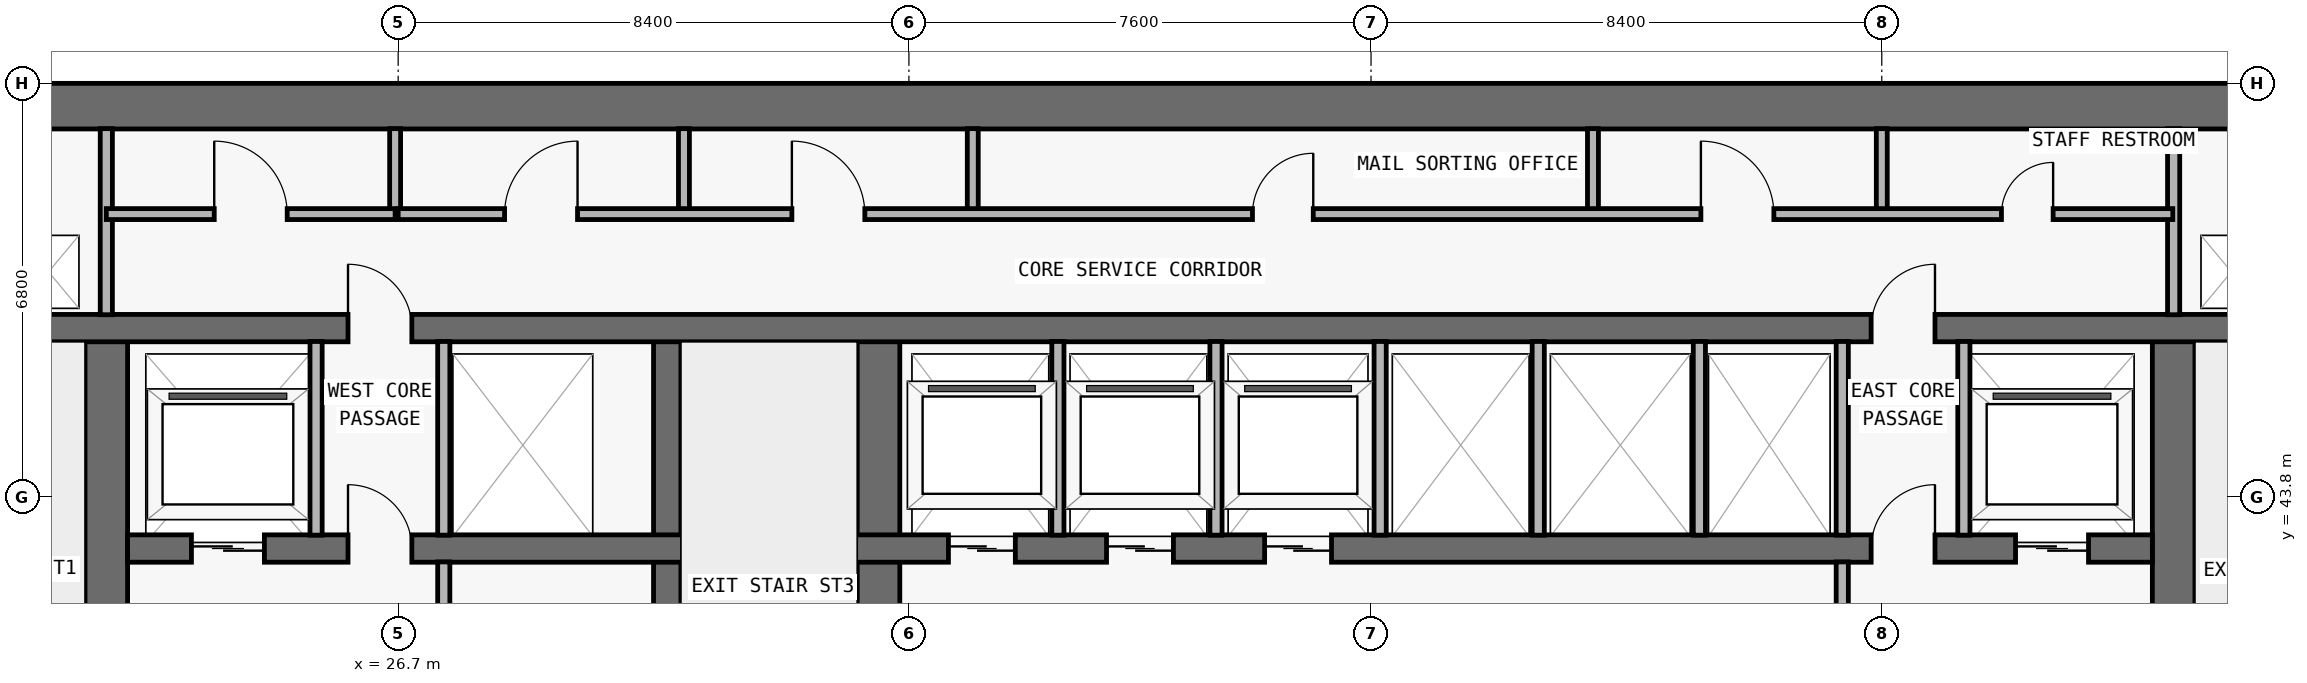
"""IFC4 building model, lengths in metres.
Left out: names, types, materials, properties, quantities, classifications, styles, units other than length and angle.
Written with IfcOpenShell. Run it as: python <this file> out.ifc"""

import sys

from ifc_helpers import new_model, si_unit, direction, frame, frame_2d, origin, place, context, subcontext, project, spatial, rectangle, extrude, element, fill, save


model = new_model("IFC4")
c1 = context("Model", 3, precision=1e-05, world=origin(), true_north=direction((0.0, 1.0)))
c2 = subcontext(c1, "Body", "Model", "MODEL_VIEW")
j1 = project(units=[si_unit("LENGTHUNIT", "METRE"), si_unit("PLANEANGLEUNIT", "RADIAN")], contexts=[c1])
p1 = place(None, origin())
s1 = spatial("IfcSite", under=j1, at=p1, CompositionType="ELEMENT")
p2 = place(p1, origin())
s2 = spatial("IfcBuilding", under=s1, at=p2, CompositionType="ELEMENT")
p3 = place(p2, frame((0.0, 0.0, 87.9)))
s3 = spatial("IfcBuildingStorey", under=s2, at=p3, CompositionType="ELEMENT", Elevation=87.9)
p4 = place(p3, frame((17.85, 50.225, 0.0), z_axis=(0.0, 0.0, 1.0), x_axis=(1.0, 0.0, 0.0)))
e1 = element("IfcWall", 1, at=p4, inside=s3, PredefinedType="SHEAR", context=c2, shape_type="SweptSolid", body=[
    extrude(rectangle(XDim=42.1, YDim=0.75, at=frame_2d((21.05, 0.0))), origin(), (0.0, 0.0, 1.0), 3.05),
])
p5 = place(p3, frame((21.9, 36.95, 0.0), z_axis=(0.0, 0.0, 1.0), x_axis=(0.0, 1.0, 0.0)))
e2 = element("IfcWall", 2, at=p5, inside=s3, PredefinedType="SHEAR", context=c2, shape_type="SweptSolid", body=[
    extrude(rectangle(XDim=9.625, YDim=0.7, at=frame_2d((4.812, 0.0))), origin(), (0.0, 0.0, 1.0), 3.05),
])
p6 = place(p5, frame((0.6, 0.0, 0.0)))
e3 = element("IfcOpeningElement", 3, at=p6, cuts=e2, PredefinedType="OPENING", context=c2, shape_type="SweptSolid", body=[
    extrude(rectangle(XDim=1.1, YDim=2.15, at=frame_2d((0.55, 1.075))), frame((0.0, 0.36, 0.0), z_axis=(0.0, -1.0, 0.0), x_axis=(1.0, 0.0, 0.0)), (0.0, 0.0, 1.0), 0.72),
])
p7 = place(p3, frame((55.9, 36.95, 0.0), z_axis=(0.0, 0.0, 1.0), x_axis=(0.0, 1.0, 0.0)))
e4 = element("IfcWall", 4, at=p7, inside=s3, PredefinedType="SHEAR", context=c2, shape_type="SweptSolid", body=[
    extrude(rectangle(XDim=9.625, YDim=0.7, at=frame_2d((4.812, 0.0))), origin(), (0.0, 0.0, 1.0), 3.05),
])
p8 = place(p7, frame((0.6, 0.0, 0.0)))
e5 = element("IfcOpeningElement", 5, at=p8, cuts=e4, PredefinedType="OPENING", context=c2, shape_type="SweptSolid", body=[
    extrude(rectangle(XDim=1.1, YDim=2.15, at=frame_2d((0.55, 1.075))), frame((0.0, 0.36, 0.0), z_axis=(0.0, -1.0, 0.0), x_axis=(1.0, 0.0, 0.0)), (0.0, 0.0, 1.0), 0.72),
])
p9 = place(p3, frame((31.125, 36.95, 0.0), z_axis=(0.0, 0.0, 1.0), x_axis=(0.0, 1.0, 0.0)))
e6 = element("IfcWall", 6, at=p9, inside=s3, PredefinedType="SHEAR", context=c2, shape_type="SweptSolid", body=[
    extrude(rectangle(XDim=9.625, YDim=0.45, at=frame_2d((4.812, 0.0))), origin(), (0.0, 0.0, 1.0), 3.05),
])
p10 = place(p3, frame((34.6, 36.95, 0.0), z_axis=(0.0, 0.0, 1.0), x_axis=(0.0, 1.0, 0.0)))
e7 = element("IfcWall", 7, at=p10, inside=s3, PredefinedType="SHEAR", context=c2, shape_type="SweptSolid", body=[
    extrude(rectangle(XDim=9.625, YDim=0.7, at=frame_2d((4.812, 0.0))), origin(), (0.0, 0.0, 1.0), 3.05),
])
p11 = place(p3, frame((22.25, 42.95, 0.0), z_axis=(0.0, 0.0, 1.0), x_axis=(1.0, 0.0, 0.0)))
e8 = element("IfcWall", 8, at=p11, inside=s3, PredefinedType="SHEAR", context=c2, shape_type="SweptSolid", body=[
    extrude(rectangle(XDim=33.3, YDim=0.45, at=frame_2d((16.65, 0.0))), origin(), (0.0, 0.0, 1.0), 3.05),
])
p12 = place(p11, frame((1.05, 0.0, 0.0)))
e9 = element("IfcOpeningElement", 9, at=p12, cuts=e8, PredefinedType="OPENING", context=c2, shape_type="SweptSolid", body=[
    extrude(rectangle(XDim=1.2, YDim=2.2, at=frame_2d((0.6, 1.1))), frame((0.0, 0.235, 0.0), z_axis=(0.0, -1.0, 0.0), x_axis=(1.0, 0.0, 0.0)), (0.0, 0.0, 1.0), 0.47),
])
p13 = place(p11, frame((31.05, 0.0, 0.0)))
e10 = element("IfcOpeningElement", 10, at=p13, cuts=e8, PredefinedType="OPENING", context=c2, shape_type="SweptSolid", body=[
    extrude(rectangle(XDim=1.2, YDim=2.2, at=frame_2d((0.6, 1.1))), frame((0.0, 0.235, 0.0), z_axis=(0.0, -1.0, 0.0), x_axis=(1.0, 0.0, 0.0)), (0.0, 0.0, 1.0), 0.47),
])
p14 = place(p11, frame((13.5, 0.0, 0.0)))
e11 = element("IfcOpeningElement", 11, at=p14, cuts=e8, PredefinedType="OPENING", context=c2, shape_type="SweptSolid", body=[
    extrude(rectangle(XDim=1.1, YDim=2.2, at=frame_2d((0.55, 1.1))), frame((0.0, 0.235, 0.0), z_axis=(0.0, -1.0, 0.0), x_axis=(1.0, 0.0, 0.0)), (0.0, 0.0, 1.0), 0.47),
])
p15 = place(p11, frame((16.1, 0.0, 0.0)))
e12 = element("IfcOpeningElement", 12, at=p15, cuts=e8, PredefinedType="OPENING", context=c2, shape_type="SweptSolid", body=[
    extrude(rectangle(XDim=1.1, YDim=2.2, at=frame_2d((0.55, 1.1))), frame((0.0, 0.235, 0.0), z_axis=(0.0, -1.0, 0.0), x_axis=(1.0, 0.0, 0.0)), (0.0, 0.0, 1.0), 0.47),
])
p16 = place(p11, frame((18.7, 0.0, 0.0)))
e13 = element("IfcOpeningElement", 13, at=p16, cuts=e8, PredefinedType="OPENING", context=c2, shape_type="SweptSolid", body=[
    extrude(rectangle(XDim=1.1, YDim=2.2, at=frame_2d((0.55, 1.1))), frame((0.0, 0.235, 0.0), z_axis=(0.0, -1.0, 0.0), x_axis=(1.0, 0.0, 0.0)), (0.0, 0.0, 1.0), 0.47),
])
p17 = place(p11, frame((3.625, 0.0, 0.0)))
e14 = element("IfcOpeningElement", 14, at=p17, cuts=e8, PredefinedType="OPENING", context=c2, shape_type="SweptSolid", body=[
    extrude(rectangle(XDim=1.05, YDim=2.15, at=frame_2d((0.525, 1.075))), frame((0.0, 0.235, 0.0), z_axis=(0.0, -1.0, 0.0), x_axis=(1.0, 0.0, 0.0)), (0.0, 0.0, 1.0), 0.47),
])
p18 = place(p11, frame((28.675, 0.0, 0.0)))
e15 = element("IfcOpeningElement", 15, at=p18, cuts=e8, PredefinedType="OPENING", context=c2, shape_type="SweptSolid", body=[
    extrude(rectangle(XDim=1.05, YDim=2.15, at=frame_2d((0.525, 1.075))), frame((0.0, 0.235, 0.0), z_axis=(0.0, -1.0, 0.0), x_axis=(1.0, 0.0, 0.0)), (0.0, 0.0, 1.0), 0.47),
])
p19 = place(p3, frame((18.25, 46.575, 0.0), z_axis=(0.0, 0.0, 1.0), x_axis=(1.0, 0.0, 0.0)))
e16 = element("IfcWall", 16, at=p19, inside=s3, PredefinedType="SHEAR", context=c2, shape_type="SweptSolid", body=[
    extrude(rectangle(XDim=41.3, YDim=0.45, at=frame_2d((20.65, 0.0))), origin(), (0.0, 0.0, 1.0), 3.05),
])
p20 = place(p19, frame((7.625, 0.0, 0.0)))
e17 = element("IfcOpeningElement", 17, at=p20, cuts=e16, PredefinedType="OPENING", context=c2, shape_type="SweptSolid", body=[
    extrude(rectangle(XDim=1.05, YDim=2.15, at=frame_2d((0.525, 1.075))), frame((0.0, 0.235, 0.0), z_axis=(0.0, -1.0, 0.0), x_axis=(1.0, 0.0, 0.0)), (0.0, 0.0, 1.0), 0.47),
])
p21 = place(p19, frame((32.675, 0.0, 0.0)))
e18 = element("IfcOpeningElement", 18, at=p21, cuts=e16, PredefinedType="OPENING", context=c2, shape_type="SweptSolid", body=[
    extrude(rectangle(XDim=1.05, YDim=2.15, at=frame_2d((0.525, 1.075))), frame((0.0, 0.235, 0.0), z_axis=(0.0, -1.0, 0.0), x_axis=(1.0, 0.0, 0.0)), (0.0, 0.0, 1.0), 0.47),
])
p22 = place(p3, frame((21.9, 46.795, 0.0), z_axis=(0.0, 0.0, 1.0), x_axis=(0.0, 1.0, 0.0)))
e19 = element("IfcWall", 19, at=p22, inside=s3, PredefinedType="PARTITIONING", context=c2, shape_type="SweptSolid", body=[
    extrude(rectangle(XDim=3.06, YDim=0.2, at=frame_2d((1.53, 0.0))), origin(), (0.0, 0.0, 1.0), 3.05),
])
p23 = place(p3, frame((25.35, 43.17, 0.0), z_axis=(0.0, 0.0, 1.0), x_axis=(0.0, 1.0, 0.0)))
e20 = element("IfcWall", 20, at=p23, inside=s3, PredefinedType="PARTITIONING", context=c2, shape_type="SweptSolid", body=[
    extrude(rectangle(XDim=3.185, YDim=0.2, at=frame_2d((1.593, 0.0))), origin(), (0.0, 0.0, 1.0), 3.05),
])
p24 = place(p3, frame((26.65, 48.45, 0.0), z_axis=(0.0, 0.0, 1.0), x_axis=(0.0, 1.0, 0.0)))
e21 = element("IfcWall", 21, at=p24, inside=s3, PredefinedType="PARTITIONING", context=c2, shape_type="SweptSolid", body=[
    extrude(rectangle(XDim=1.405, YDim=0.18, at=frame_2d((0.703, 0.0))), origin(), (0.0, 0.0, 1.0), 3.05),
])
p25 = place(p3, frame((27.45, 37.345, 0.0), z_axis=(0.0, 0.0, 1.0), x_axis=(0.0, 1.0, 0.0)))
e22 = element("IfcWall", 22, at=p25, inside=s3, PredefinedType="PARTITIONING", context=c2, shape_type="SweptSolid", body=[
    extrude(rectangle(XDim=5.385, YDim=0.2, at=frame_2d((2.692, 0.0))), origin(), (0.0, 0.0, 1.0), 3.05),
])
p26 = place(p3, frame((27.45, 43.17, 0.0), z_axis=(0.0, 0.0, 1.0), x_axis=(0.0, 1.0, 0.0)))
e23 = element("IfcWall", 23, at=p26, inside=s3, PredefinedType="PARTITIONING", context=c2, shape_type="SweptSolid", body=[
    extrude(rectangle(XDim=3.185, YDim=0.2, at=frame_2d((1.593, 0.0))), origin(), (0.0, 0.0, 1.0), 3.05),
])
for number, where, z_axis, x_axis in (
    (24, (31.4, 48.45, 0.0), (0.0, 0.0, 1.0), (0.0, 1.0, 0.0)),
    (25, (36.15, 48.45, 0.0), (0.0, 0.0, 1.0), (0.0, 1.0, 0.0)),
):
    element("IfcWall", number, at=place(p3, frame(where, z_axis=z_axis, x_axis=x_axis)), inside=s3, PredefinedType="PARTITIONING", context=c2, shape_type="SweptSolid", body=[
        extrude(rectangle(XDim=1.405, YDim=0.18, at=frame_2d((0.703, 0.0))), origin(), (0.0, 0.0, 1.0), 3.05),
    ])
for number, where, z_axis, x_axis in (
    (26, (37.55, 43.17, 0.0), (0.0, 0.0, 1.0), (0.0, 1.0, 0.0)),
    (27, (40.15, 43.17, 0.0), (0.0, 0.0, 1.0), (0.0, 1.0, 0.0)),
    (28, (42.85, 43.17, 0.0), (0.0, 0.0, 1.0), (0.0, 1.0, 0.0)),
    (29, (45.45, 43.17, 0.0), (0.0, 0.0, 1.0), (0.0, 1.0, 0.0)),
):
    element("IfcWall", number, at=place(p3, frame(where, z_axis=z_axis, x_axis=x_axis)), inside=s3, PredefinedType="PARTITIONING", context=c2, shape_type="SweptSolid", body=[
        extrude(rectangle(XDim=3.185, YDim=0.2, at=frame_2d((1.593, 0.0))), origin(), (0.0, 0.0, 1.0), 3.05),
    ])
p27 = place(p3, frame((46.35, 48.45, 0.0), z_axis=(0.0, 0.0, 1.0), x_axis=(0.0, 1.0, 0.0)))
e30 = element("IfcWall", 30, at=p27, inside=s3, PredefinedType="PARTITIONING", context=c2, shape_type="SweptSolid", body=[
    extrude(rectangle(XDim=1.405, YDim=0.18, at=frame_2d((0.703, 0.0))), origin(), (0.0, 0.0, 1.0), 3.05),
])
p28 = place(p3, frame((48.1, 43.17, 0.0), z_axis=(0.0, 0.0, 1.0), x_axis=(0.0, 1.0, 0.0)))
e31 = element("IfcWall", 31, at=p28, inside=s3, PredefinedType="PARTITIONING", context=c2, shape_type="SweptSolid", body=[
    extrude(rectangle(XDim=3.185, YDim=0.2, at=frame_2d((1.593, 0.0))), origin(), (0.0, 0.0, 1.0), 3.05),
])
p29 = place(p3, frame((50.45, 37.345, 0.0), z_axis=(0.0, 0.0, 1.0), x_axis=(0.0, 1.0, 0.0)))
e32 = element("IfcWall", 32, at=p29, inside=s3, PredefinedType="PARTITIONING", context=c2, shape_type="SweptSolid", body=[
    extrude(rectangle(XDim=5.385, YDim=0.2, at=frame_2d((2.692, 0.0))), origin(), (0.0, 0.0, 1.0), 3.05),
])
p30 = place(p3, frame((50.45, 43.17, 0.0), z_axis=(0.0, 0.0, 1.0), x_axis=(0.0, 1.0, 0.0)))
e33 = element("IfcWall", 33, at=p30, inside=s3, PredefinedType="PARTITIONING", context=c2, shape_type="SweptSolid", body=[
    extrude(rectangle(XDim=3.185, YDim=0.2, at=frame_2d((1.593, 0.0))), origin(), (0.0, 0.0, 1.0), 3.05),
])
p31 = place(p3, frame((51.1, 48.45, 0.0), z_axis=(0.0, 0.0, 1.0), x_axis=(0.0, 1.0, 0.0)))
e34 = element("IfcWall", 34, at=p31, inside=s3, PredefinedType="PARTITIONING", context=c2, shape_type="SweptSolid", body=[
    extrude(rectangle(XDim=1.405, YDim=0.18, at=frame_2d((0.703, 0.0))), origin(), (0.0, 0.0, 1.0), 3.05),
])
p32 = place(p3, frame((52.45, 43.17, 0.0), z_axis=(0.0, 0.0, 1.0), x_axis=(0.0, 1.0, 0.0)))
e35 = element("IfcWall", 35, at=p32, inside=s3, PredefinedType="PARTITIONING", context=c2, shape_type="SweptSolid", body=[
    extrude(rectangle(XDim=3.185, YDim=0.2, at=frame_2d((1.593, 0.0))), origin(), (0.0, 0.0, 1.0), 3.05),
])
p33 = place(p3, frame((55.9, 46.795, 0.0), z_axis=(0.0, 0.0, 1.0), x_axis=(0.0, 1.0, 0.0)))
e36 = element("IfcWall", 36, at=p33, inside=s3, PredefinedType="PARTITIONING", context=c2, shape_type="SweptSolid", body=[
    extrude(rectangle(XDim=3.06, YDim=0.2, at=frame_2d((1.53, 0.0))), origin(), (0.0, 0.0, 1.0), 3.05),
])
p34 = place(p3, frame((21.9, 48.45, 0.0), z_axis=(0.0, 0.0, 1.0), x_axis=(1.0, 0.0, 0.0)))
e37 = element("IfcWall", 37, at=p34, inside=s3, PredefinedType="PARTITIONING", context=c2, shape_type="SweptSolid", body=[
    extrude(rectangle(XDim=4.75, YDim=0.18, at=frame_2d((2.375, 0.0))), origin(), (0.0, 0.0, 1.0), 3.05),
])
p35 = place(p34, frame((1.775, 0.0, 0.0)))
e38 = element("IfcOpeningElement", 38, at=p35, cuts=e37, PredefinedType="OPENING", context=c2, shape_type="SweptSolid", body=[
    extrude(rectangle(XDim=1.2, YDim=2.2, at=frame_2d((0.6, 1.1))), frame((0.0, 0.1, 0.0), z_axis=(0.0, -1.0, 0.0), x_axis=(1.0, 0.0, 0.0)), (0.0, 0.0, 1.0), 0.2),
])
p36 = place(p3, frame((26.7, 48.45, 0.0), z_axis=(0.0, 0.0, 1.0), x_axis=(1.0, 0.0, 0.0)))
e39 = element("IfcWall", 39, at=p36, inside=s3, PredefinedType="PARTITIONING", context=c2, shape_type="SweptSolid", body=[
    extrude(rectangle(XDim=29.186, YDim=0.18, at=frame_2d((14.593, 0.0))), origin(), (0.0, 0.0, 1.0), 3.05),
])
p37 = place(p36, frame((1.75, 0.0, 0.0)))
e40 = element("IfcOpeningElement", 40, at=p37, cuts=e39, PredefinedType="OPENING", context=c2, shape_type="SweptSolid", body=[
    extrude(rectangle(XDim=1.2, YDim=2.2, at=frame_2d((0.6, 1.1))), frame((0.0, 0.1, 0.0), z_axis=(0.0, -1.0, 0.0), x_axis=(1.0, 0.0, 0.0)), (0.0, 0.0, 1.0), 0.2),
])
p38 = place(p36, frame((6.475, 0.0, 0.0)))
e41 = element("IfcOpeningElement", 41, at=p38, cuts=e39, PredefinedType="OPENING", context=c2, shape_type="SweptSolid", body=[
    extrude(rectangle(XDim=1.2, YDim=2.2, at=frame_2d((0.6, 1.1))), frame((0.0, 0.1, 0.0), z_axis=(0.0, -1.0, 0.0), x_axis=(1.0, 0.0, 0.0)), (0.0, 0.0, 1.0), 0.2),
])
p39 = place(p36, frame((14.05, 0.0, 0.0)))
e42 = element("IfcOpeningElement", 42, at=p39, cuts=e39, PredefinedType="OPENING", context=c2, shape_type="SweptSolid", body=[
    extrude(rectangle(XDim=1.0, YDim=2.2, at=frame_2d((0.5, 1.1))), frame((0.0, 0.1, 0.0), z_axis=(0.0, -1.0, 0.0), x_axis=(1.0, 0.0, 0.0)), (0.0, 0.0, 1.0), 0.2),
])
p40 = place(p36, frame((21.425, 0.0, 0.0)))
e43 = element("IfcOpeningElement", 43, at=p40, cuts=e39, PredefinedType="OPENING", context=c2, shape_type="SweptSolid", body=[
    extrude(rectangle(XDim=1.2, YDim=2.2, at=frame_2d((0.6, 1.1))), frame((0.0, 0.1, 0.0), z_axis=(0.0, -1.0, 0.0), x_axis=(1.0, 0.0, 0.0)), (0.0, 0.0, 1.0), 0.2),
])
p41 = place(p36, frame((26.368, 0.0, 0.0)))
e44 = element("IfcOpeningElement", 44, at=p41, cuts=e39, PredefinedType="OPENING", context=c2, shape_type="SweptSolid", body=[
    extrude(rectangle(XDim=0.85, YDim=2.1, at=frame_2d((0.425, 1.05))), frame((0.0, 0.1, 0.0), z_axis=(0.0, -1.0, 0.0), x_axis=(1.0, 0.0, 0.0)), (0.0, 0.0, 1.0), 0.2),
])
p42 = place(p12, origin())
e45 = element("IfcDoor", 45, at=p42, inside=s3, OperationType="DOUBLE_DOOR_SLIDING", PredefinedType="DOOR", context=c2, shape_type="SweptSolid", body=[
    extrude(rectangle(XDim=1.2, YDim=2.2, at=frame_2d((0.6, 1.1))), frame((0.0, 0.025, 0.0), z_axis=(0.0, -1.0, 0.0), x_axis=(1.0, 0.0, 0.0)), (0.0, 0.0, 1.0), 0.05),
])
fill(e9, e45)
p43 = place(p13, origin())
e46 = element("IfcDoor", 46, at=p43, inside=s3, OperationType="DOUBLE_DOOR_SLIDING", PredefinedType="DOOR", context=c2, shape_type="SweptSolid", body=[
    extrude(rectangle(XDim=1.2, YDim=2.2, at=frame_2d((0.6, 1.1))), frame((0.0, 0.025, 0.0), z_axis=(0.0, -1.0, 0.0), x_axis=(1.0, 0.0, 0.0)), (0.0, 0.0, 1.0), 0.05),
])
fill(e10, e46)
p44 = place(p14, origin())
e47 = element("IfcDoor", 47, at=p44, inside=s3, OperationType="DOUBLE_DOOR_SLIDING", PredefinedType="DOOR", context=c2, shape_type="SweptSolid", body=[
    extrude(rectangle(XDim=1.1, YDim=2.2, at=frame_2d((0.55, 1.1))), frame((0.0, 0.025, 0.0), z_axis=(0.0, -1.0, 0.0), x_axis=(1.0, 0.0, 0.0)), (0.0, 0.0, 1.0), 0.05),
])
fill(e11, e47)
p45 = place(p15, origin())
e48 = element("IfcDoor", 48, at=p45, inside=s3, OperationType="DOUBLE_DOOR_SLIDING", PredefinedType="DOOR", context=c2, shape_type="SweptSolid", body=[
    extrude(rectangle(XDim=1.1, YDim=2.2, at=frame_2d((0.55, 1.1))), frame((0.0, 0.025, 0.0), z_axis=(0.0, -1.0, 0.0), x_axis=(1.0, 0.0, 0.0)), (0.0, 0.0, 1.0), 0.05),
])
fill(e12, e48)
p46 = place(p16, origin())
e49 = element("IfcDoor", 49, at=p46, inside=s3, OperationType="DOUBLE_DOOR_SLIDING", PredefinedType="DOOR", context=c2, shape_type="SweptSolid", body=[
    extrude(rectangle(XDim=1.1, YDim=2.2, at=frame_2d((0.55, 1.1))), frame((0.0, 0.025, 0.0), z_axis=(0.0, -1.0, 0.0), x_axis=(1.0, 0.0, 0.0)), (0.0, 0.0, 1.0), 0.05),
])
fill(e13, e49)
p47 = place(p17, origin())
e50 = element("IfcDoor", 50, at=p47, inside=s3, OperationType="SINGLE_SWING_LEFT", PredefinedType="DOOR", context=c2, shape_type="SweptSolid", body=[
    extrude(rectangle(XDim=1.05, YDim=2.15, at=frame_2d((0.525, 1.075))), frame((0.0, 0.025, 0.0), z_axis=(0.0, -1.0, 0.0), x_axis=(1.0, 0.0, 0.0)), (0.0, 0.0, 1.0), 0.05),
])
fill(e14, e50)
p48 = place(p18, origin())
e51 = element("IfcDoor", 51, at=p48, inside=s3, OperationType="SINGLE_SWING_RIGHT", PredefinedType="DOOR", context=c2, shape_type="SweptSolid", body=[
    extrude(rectangle(XDim=1.05, YDim=2.15, at=frame_2d((0.525, 1.075))), frame((0.0, 0.025, 0.0), z_axis=(0.0, -1.0, 0.0), x_axis=(1.0, 0.0, 0.0)), (0.0, 0.0, 1.0), 0.05),
])
fill(e15, e51)
p49 = place(p20, origin())
e52 = element("IfcDoor", 52, at=p49, inside=s3, OperationType="SINGLE_SWING_LEFT", PredefinedType="DOOR", context=c2, shape_type="SweptSolid", body=[
    extrude(rectangle(XDim=1.05, YDim=2.15, at=frame_2d((0.525, 1.075))), frame((0.0, 0.025, 0.0), z_axis=(0.0, -1.0, 0.0), x_axis=(1.0, 0.0, 0.0)), (0.0, 0.0, 1.0), 0.05),
])
fill(e17, e52)
p50 = place(p21, origin())
e53 = element("IfcDoor", 53, at=p50, inside=s3, OperationType="SINGLE_SWING_RIGHT", PredefinedType="DOOR", context=c2, shape_type="SweptSolid", body=[
    extrude(rectangle(XDim=1.05, YDim=2.15, at=frame_2d((0.525, 1.075))), frame((0.0, 0.025, 0.0), z_axis=(0.0, -1.0, 0.0), x_axis=(1.0, 0.0, 0.0)), (0.0, 0.0, 1.0), 0.05),
])
fill(e18, e53)
p51 = place(p35, origin())
e54 = element("IfcDoor", 54, at=p51, inside=s3, OperationType="SINGLE_SWING_LEFT", PredefinedType="DOOR", context=c2, shape_type="SweptSolid", body=[
    extrude(rectangle(XDim=1.2, YDim=2.2, at=frame_2d((0.6, 1.1))), frame((0.0, 0.025, 0.0), z_axis=(0.0, -1.0, 0.0), x_axis=(1.0, 0.0, 0.0)), (0.0, 0.0, 1.0), 0.05),
])
fill(e38, e54)
p52 = place(p37, origin())
e55 = element("IfcDoor", 55, at=p52, inside=s3, OperationType="SINGLE_SWING_RIGHT", PredefinedType="DOOR", context=c2, shape_type="SweptSolid", body=[
    extrude(rectangle(XDim=1.2, YDim=2.2, at=frame_2d((0.6, 1.1))), frame((0.0, 0.025, 0.0), z_axis=(0.0, -1.0, 0.0), x_axis=(1.0, 0.0, 0.0)), (0.0, 0.0, 1.0), 0.05),
])
fill(e40, e55)
p53 = place(p38, origin())
e56 = element("IfcDoor", 56, at=p53, inside=s3, OperationType="SINGLE_SWING_LEFT", PredefinedType="DOOR", context=c2, shape_type="SweptSolid", body=[
    extrude(rectangle(XDim=1.2, YDim=2.2, at=frame_2d((0.6, 1.1))), frame((0.0, 0.025, 0.0), z_axis=(0.0, -1.0, 0.0), x_axis=(1.0, 0.0, 0.0)), (0.0, 0.0, 1.0), 0.05),
])
fill(e41, e56)
p54 = place(p39, origin())
e57 = element("IfcDoor", 57, at=p54, inside=s3, OperationType="SINGLE_SWING_RIGHT", PredefinedType="DOOR", context=c2, shape_type="SweptSolid", body=[
    extrude(rectangle(XDim=1.0, YDim=2.2, at=frame_2d((0.5, 1.1))), frame((0.0, 0.025, 0.0), z_axis=(0.0, -1.0, 0.0), x_axis=(1.0, 0.0, 0.0)), (0.0, 0.0, 1.0), 0.05),
])
fill(e42, e57)
p55 = place(p40, origin())
e58 = element("IfcDoor", 58, at=p55, inside=s3, OperationType="SINGLE_SWING_LEFT", PredefinedType="DOOR", context=c2, shape_type="SweptSolid", body=[
    extrude(rectangle(XDim=1.2, YDim=2.2, at=frame_2d((0.6, 1.1))), frame((0.0, 0.025, 0.0), z_axis=(0.0, -1.0, 0.0), x_axis=(1.0, 0.0, 0.0)), (0.0, 0.0, 1.0), 0.05),
])
fill(e43, e58)
p56 = place(p41, origin())
e59 = element("IfcDoor", 59, at=p56, inside=s3, OperationType="SINGLE_SWING_RIGHT", PredefinedType="DOOR", context=c2, shape_type="SweptSolid", body=[
    extrude(rectangle(XDim=0.85, YDim=2.1, at=frame_2d((0.425, 1.05))), frame((0.0, 0.025, 0.0), z_axis=(0.0, -1.0, 0.0), x_axis=(1.0, 0.0, 0.0)), (0.0, 0.0, 1.0), 0.05),
])
fill(e44, e59)
save(model, sys.argv[1])
